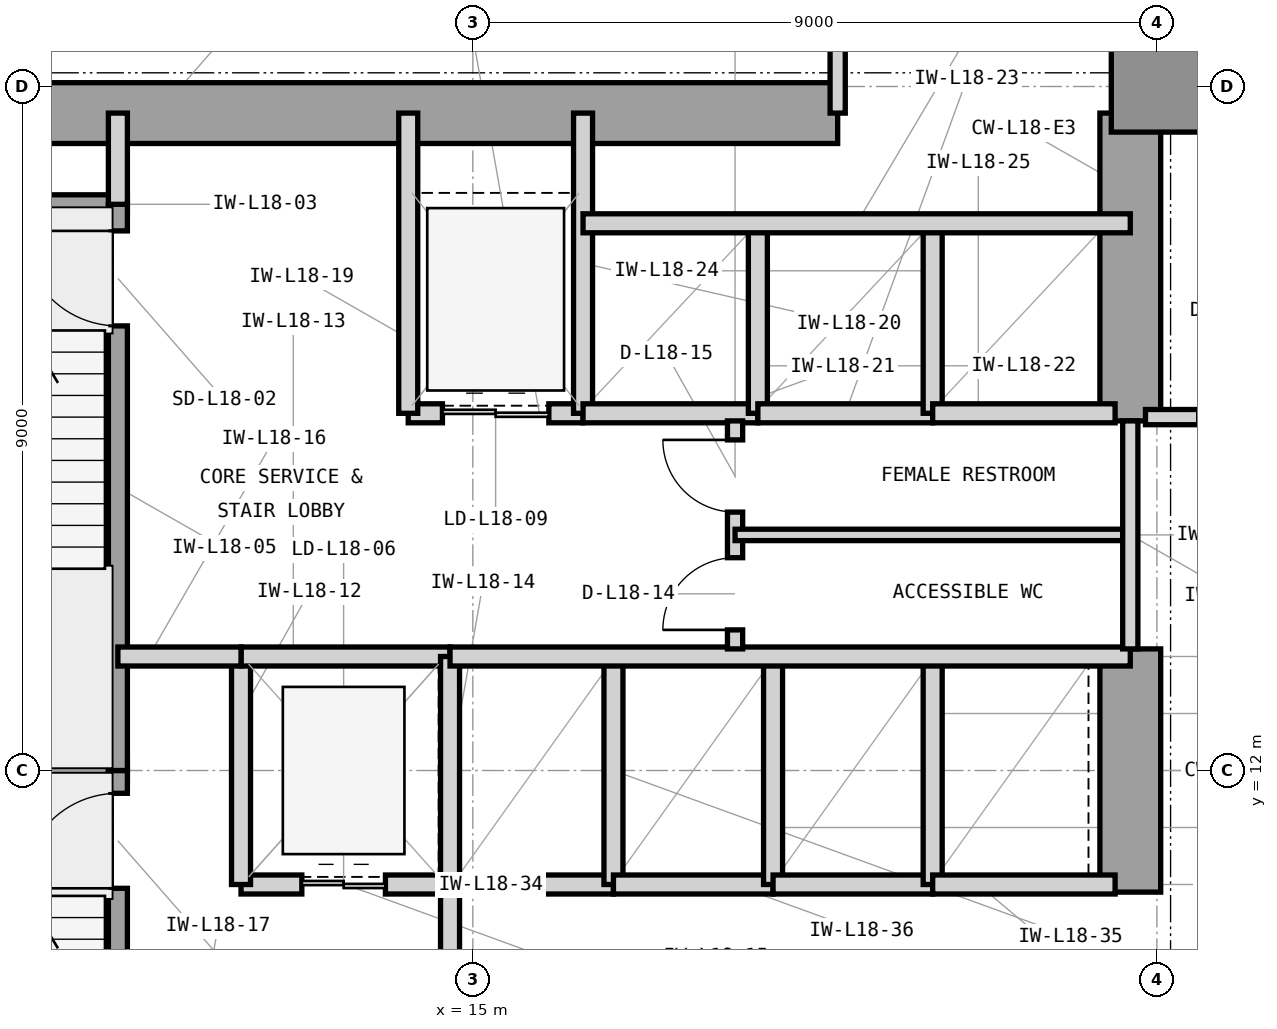
"""IFC4 building model, lengths in metres.
Left out: names, types, materials, properties, quantities, classifications, styles, units other than length and angle.
Written with IfcOpenShell. Run it as: python <this file> out.ifc"""

import sys

from ifc_helpers import new_model, si_unit, direction, frame, frame_2d, origin, origin_2d, place, context, subcontext, project, spatial, rectangle, extrude, element, fill, save


model = new_model("IFC4")
c1 = context("Model", 3, precision=1e-05, world=origin(), true_north=direction((0.0, 1.0)))
c2 = subcontext(c1, "Body", "Model", "MODEL_VIEW")
j1 = project(units=[si_unit("LENGTHUNIT", "METRE"), si_unit("PLANEANGLEUNIT", "RADIAN")], contexts=[c1])
p1 = place(None, origin())
s1 = spatial("IfcSite", under=j1, at=p1, CompositionType="ELEMENT")
p2 = place(p1, origin())
s2 = spatial("IfcBuilding", under=s1, at=p2, CompositionType="ELEMENT")
p3 = place(p2, frame((0.0, 0.0, 80.4)))
s3 = spatial("IfcBuildingStorey", under=s2, at=p3, CompositionType="ELEMENT", Elevation=80.4)
p4 = place(p3, frame((7.475, 20.65, 0.0), z_axis=(0.0, 0.0, 1.0), x_axis=(1.0, 0.0, 0.0)))
e1 = element("IfcWall", 1, at=p4, inside=s3, PredefinedType="SHEAR", context=c2, shape_type="SweptSolid", body=[
    extrude(rectangle(XDim=12.325, YDim=0.8, at=frame_2d((6.163, 0.0))), origin(), (0.0, 0.0, 1.0), 4.2),
])
p5 = place(p3, frame((23.65, 10.4, 0.0), z_axis=(0.0, 0.0, 1.0), x_axis=(0.0, 1.0, 0.0)))
e2 = element("IfcWall", 2, at=p5, inside=s3, PredefinedType="SHEAR", context=c2, shape_type="SweptSolid", body=[
    extrude(rectangle(XDim=3.2, YDim=0.8, at=frame_2d((1.6, 0.0))), origin(), (0.0, 0.0, 1.0), 4.2),
])
p6 = place(p3, frame((23.65, 16.6, 0.0), z_axis=(0.0, 0.0, 1.0), x_axis=(0.0, 1.0, 0.0)))
e3 = element("IfcWall", 3, at=p6, inside=s3, PredefinedType="SHEAR", context=c2, shape_type="SweptSolid", body=[
    extrude(rectangle(XDim=4.05, YDim=0.8, at=frame_2d((2.025, 0.0))), origin(), (0.0, 0.0, 1.0), 4.2),
])
p7 = place(p3, frame((24.0, 21.0, 0.0), z_axis=(0.0, 0.0, 1.0), x_axis=(1.0, 0.0, 0.0)))
e4 = element("IfcColumn", 4, at=p7, inside=s3, PredefinedType="COLUMN", context=c2, shape_type="SweptSolid", body=[
    extrude(rectangle(XDim=1.2, YDim=1.2, at=origin_2d()), origin(), (0.0, 0.0, 1.0), 4.2),
])
p8 = place(p3, frame((64.4, 20.79, 0.0), z_axis=(0.0, 0.0, 1.0), x_axis=(-1.0, 0.0, 0.0)))
e5 = element("IfcWall", 5, at=p8, inside=s3, PredefinedType="STANDARD", context=c2, shape_type="SweptSolid", body=[
    extrude(rectangle(XDim=40.4, YDim=0.42, at=frame_2d((20.2, 0.0))), origin(), (0.0, 0.0, 1.0), 3.92),
])
p9 = place(p8, frame((38.222, 0.0, 0.85)))
e6 = element("IfcOpeningElement", 6, at=p9, cuts=e5, PredefinedType="OPENING", context=c2, shape_type="SweptSolid", body=[
    extrude(rectangle(XDim=1.2, YDim=2.45, at=frame_2d((0.6, 1.225))), frame((0.0, 0.22, 0.0), z_axis=(0.0, -1.0, 0.0), x_axis=(1.0, 0.0, 0.0)), (0.0, 0.0, 1.0), 0.44),
])
p10 = place(p8, frame((32.386, 0.0, 0.85)))
e7 = element("IfcOpeningElement", 7, at=p10, cuts=e5, PredefinedType="OPENING", context=c2, shape_type="SweptSolid", body=[
    extrude(rectangle(XDim=2.8, YDim=2.45, at=frame_2d((1.4, 1.225))), frame((0.0, 0.22, 0.0), z_axis=(0.0, -1.0, 0.0), x_axis=(1.0, 0.0, 0.0)), (0.0, 0.0, 1.0), 0.44),
])
p11 = place(p8, frame((23.386, 0.0, 0.85)))
e8 = element("IfcOpeningElement", 8, at=p11, cuts=e5, PredefinedType="OPENING", context=c2, shape_type="SweptSolid", body=[
    extrude(rectangle(XDim=2.8, YDim=2.45, at=frame_2d((1.4, 1.225))), frame((0.0, 0.22, 0.0), z_axis=(0.0, -1.0, 0.0), x_axis=(1.0, 0.0, 0.0)), (0.0, 0.0, 1.0), 0.44),
])
p12 = place(p8, frame((17.386, 0.0, 0.85)))
e9 = element("IfcOpeningElement", 9, at=p12, cuts=e5, PredefinedType="OPENING", context=c2, shape_type="SweptSolid", body=[
    extrude(rectangle(XDim=2.1, YDim=2.45, at=frame_2d((1.05, 1.225))), frame((0.0, 0.22, 0.0), z_axis=(0.0, -1.0, 0.0), x_axis=(1.0, 0.0, 0.0)), (0.0, 0.0, 1.0), 0.44),
])
p13 = place(p8, frame((8.436, 0.0, 0.85)))
e10 = element("IfcOpeningElement", 10, at=p13, cuts=e5, PredefinedType="OPENING", context=c2, shape_type="SweptSolid", body=[
    extrude(rectangle(XDim=1.2, YDim=2.45, at=frame_2d((0.6, 1.225))), frame((0.0, 0.22, 0.0), z_axis=(0.0, -1.0, 0.0), x_axis=(1.0, 0.0, 0.0)), (0.0, 0.0, 1.0), 0.44),
])
p14 = place(p3, frame((23.79, 21.0, 0.0), z_axis=(0.0, 0.0, 1.0), x_axis=(0.0, 1.0, 0.0)))
e11 = element("IfcWall", 11, at=p14, inside=s3, PredefinedType="STANDARD", context=c2, shape_type="SweptSolid", body=[
    extrude(rectangle(XDim=28.4, YDim=0.42, at=frame_2d((14.2, 0.0))), origin(), (0.0, 0.0, 1.0), 3.92),
])
p15 = place(p14, frame((10.433, 0.0, 0.85)))
e12 = element("IfcOpeningElement", 12, at=p15, cuts=e11, PredefinedType="OPENING", context=c2, shape_type="SweptSolid", body=[
    extrude(rectangle(XDim=2.8, YDim=2.45, at=frame_2d((1.4, 1.225))), frame((0.0, 0.22, 0.0), z_axis=(0.0, -1.0, 0.0), x_axis=(1.0, 0.0, 0.0)), (0.0, 0.0, 1.0), 0.44),
])
p16 = place(p14, frame((21.966, 0.0, 0.85)))
e13 = element("IfcOpeningElement", 13, at=p16, cuts=e11, PredefinedType="OPENING", context=c2, shape_type="SweptSolid", body=[
    extrude(rectangle(XDim=1.2, YDim=2.45, at=frame_2d((0.6, 1.225))), frame((0.0, 0.22, 0.0), z_axis=(0.0, -1.0, 0.0), x_axis=(1.0, 0.0, 0.0)), (0.0, 0.0, 1.0), 0.44),
])
p17 = place(p3, frame((6.35, 12.0, 0.0), z_axis=(0.0, 0.0, 1.0), x_axis=(1.0, 0.0, 0.0)))
e14 = element("IfcWall", 14, at=p17, inside=s3, PredefinedType="SHEAR", context=c2, shape_type="SweptSolid", body=[
    extrude(rectangle(XDim=4.105, YDim=0.25, at=frame_2d((2.052, 0.0))), origin(), (0.0, 0.0, 1.0), 4.2),
])
p18 = place(p3, frame((7.7, 19.45, 0.0), z_axis=(0.0, 0.0, 1.0), x_axis=(1.0, 0.0, 0.0)))
e15 = element("IfcWall", 15, at=p18, inside=s3, PredefinedType="SHEAR", context=c2, shape_type="SweptSolid", body=[
    extrude(rectangle(XDim=2.755, YDim=0.25, at=frame_2d((1.377, 0.0))), origin(), (0.0, 0.0, 1.0), 4.2),
])
p19 = place(p3, frame((10.33, 4.55, 0.0), z_axis=(0.0, 0.0, 1.0), x_axis=(0.0, 1.0, 0.0)))
e16 = element("IfcWall", 16, at=p19, inside=s3, PredefinedType="SHEAR", context=c2, shape_type="SweptSolid", body=[
    extrude(rectangle(XDim=7.45, YDim=0.25, at=frame_2d((3.725, 0.0))), origin(), (0.0, 0.0, 1.0), 4.2),
])
p20 = place(p19, frame((5.9, 0.0, 0.0)))
e17 = element("IfcOpeningElement", 17, at=p20, cuts=e16, PredefinedType="OPENING", context=c2, shape_type="SweptSolid", body=[
    extrude(rectangle(XDim=1.25, YDim=2.2, at=frame_2d((0.625, 1.1))), frame((0.0, 0.135, 0.0), z_axis=(0.0, -1.0, 0.0), x_axis=(1.0, 0.0, 0.0)), (0.0, 0.0, 1.0), 0.27),
])
p21 = place(p3, frame((10.33, 12.0, 0.0), z_axis=(0.0, 0.0, 1.0), x_axis=(0.0, 1.0, 0.0)))
e18 = element("IfcWall", 18, at=p21, inside=s3, PredefinedType="SHEAR", context=c2, shape_type="SweptSolid", body=[
    extrude(rectangle(XDim=7.45, YDim=0.25, at=frame_2d((3.725, 0.0))), origin(), (0.0, 0.0, 1.0), 4.2),
])
p22 = place(p21, frame((5.85, 0.0, 0.0)))
e19 = element("IfcOpeningElement", 19, at=p22, cuts=e18, PredefinedType="OPENING", context=c2, shape_type="SweptSolid", body=[
    extrude(rectangle(XDim=1.25, YDim=2.2, at=frame_2d((0.625, 1.1))), frame((0.0, 0.135, 0.0), z_axis=(0.0, -1.0, 0.0), x_axis=(1.0, 0.0, 0.0)), (0.0, 0.0, 1.0), 0.27),
])
p23 = place(p3, frame((10.33, 19.45, 0.0), z_axis=(0.0, 0.0, 1.0), x_axis=(0.0, 1.0, 0.0)))
e20 = element("IfcWall", 20, at=p23, inside=s3, PredefinedType="PARTITIONING", context=c2, shape_type="SweptSolid", body=[
    extrude(rectangle(XDim=1.2, YDim=0.25, at=frame_2d((0.6, 0.0))), origin(), (0.0, 0.0, 1.0), 2.983),
])
p24 = place(p3, frame((11.95, 10.5, 0.0), z_axis=(0.0, 0.0, 1.0), x_axis=(1.0, 0.0, 0.0)))
e21 = element("IfcWall", 21, at=p24, inside=s3, PredefinedType="PARTITIONING", context=c2, shape_type="SweptSolid", body=[
    extrude(rectangle(XDim=2.75, YDim=0.25, at=frame_2d((1.375, 0.0))), origin(), (0.0, 0.0, 1.0), 3.293),
])
p25 = place(p24, frame((0.8, 0.0, 0.0)))
e22 = element("IfcOpeningElement", 22, at=p25, cuts=e21, PredefinedType="OPENING", context=c2, shape_type="SweptSolid", body=[
    extrude(rectangle(XDim=1.1, YDim=2.25, at=frame_2d((0.55, 1.125))), frame((0.0, 0.135, 0.0), z_axis=(0.0, -1.0, 0.0), x_axis=(1.0, 0.0, 0.0)), (0.0, 0.0, 1.0), 0.27),
])
p26 = place(p3, frame((11.95, 10.5, 0.0), z_axis=(0.0, 0.0, 1.0), x_axis=(0.0, 1.0, 0.0)))
e23 = element("IfcWall", 23, at=p26, inside=s3, PredefinedType="PARTITIONING", context=c2, shape_type="SweptSolid", body=[
    extrude(rectangle(XDim=3.0, YDim=0.25, at=frame_2d((1.5, 0.0))), origin(), (0.0, 0.0, 1.0), 3.91),
])
p27 = place(p3, frame((11.95, 13.5, 0.0), z_axis=(0.0, 0.0, 1.0), x_axis=(1.0, 0.0, 0.0)))
e24 = element("IfcWall", 24, at=p27, inside=s3, PredefinedType="PARTITIONING", context=c2, shape_type="SweptSolid", body=[
    extrude(rectangle(XDim=2.75, YDim=0.25, at=frame_2d((1.375, 0.0))), origin(), (0.0, 0.0, 1.0), 3.293),
])
p28 = place(p3, frame((14.7, 10.5, 0.0), z_axis=(0.0, 0.0, 1.0), x_axis=(0.0, 1.0, 0.0)))
e25 = element("IfcWall", 25, at=p28, inside=s3, PredefinedType="PARTITIONING", context=c2, shape_type="SweptSolid", body=[
    extrude(rectangle(XDim=3.0, YDim=0.25, at=frame_2d((1.5, 0.0))), origin(), (0.0, 0.0, 1.0), 3.91),
])
p29 = place(p3, frame((14.7, 6.7, 0.0), z_axis=(0.0, 0.0, 1.0), x_axis=(0.0, 1.0, 0.0)))
e26 = element("IfcWall", 26, at=p29, inside=s3, PredefinedType="PARTITIONING", context=c2, shape_type="SweptSolid", body=[
    extrude(rectangle(XDim=3.8, YDim=0.25, at=frame_2d((1.9, 0.0))), origin(), (0.0, 0.0, 1.0), 3.91),
])
p30 = place(p29, frame((1.3, 0.0, 0.0)))
e27 = element("IfcOpeningElement", 27, at=p30, cuts=e26, PredefinedType="OPENING", context=c2, shape_type="SweptSolid", body=[
    extrude(rectangle(XDim=1.2, YDim=2.2, at=frame_2d((0.6, 1.1))), frame((0.0, 0.135, 0.0), z_axis=(0.0, -1.0, 0.0), x_axis=(1.0, 0.0, 0.0)), (0.0, 0.0, 1.0), 0.27),
])
p31 = place(p3, frame((10.33, 13.5, 0.0), z_axis=(0.0, 0.0, 1.0), x_axis=(1.0, 0.0, 0.0)))
e28 = element("IfcWall", 28, at=p31, inside=s3, PredefinedType="PARTITIONING", context=c2, shape_type="SweptSolid", body=[
    extrude(rectangle(XDim=1.62, YDim=0.25, at=frame_2d((0.81, 0.0))), origin(), (0.0, 0.0, 1.0), 3.293),
])
p32 = place(p3, frame((14.15, 16.7, 0.0), z_axis=(0.0, 0.0, 1.0), x_axis=(1.0, 0.0, 0.0)))
e29 = element("IfcWall", 29, at=p32, inside=s3, PredefinedType="PARTITIONING", context=c2, shape_type="SweptSolid", body=[
    extrude(rectangle(XDim=2.3, YDim=0.25, at=frame_2d((1.15, 0.0))), origin(), (0.0, 0.0, 1.0), 3.293),
])
p33 = place(p32, frame((0.45, 0.0, 0.0)))
e30 = element("IfcOpeningElement", 30, at=p33, cuts=e29, PredefinedType="OPENING", context=c2, shape_type="SweptSolid", body=[
    extrude(rectangle(XDim=1.4, YDim=2.35, at=frame_2d((0.7, 1.175))), frame((0.0, 0.135, 0.0), z_axis=(0.0, -1.0, 0.0), x_axis=(1.0, 0.0, 0.0)), (0.0, 0.0, 1.0), 0.27),
])
for number, where, z_axis, x_axis in (
    (31, (14.15, 16.7, 0.0), (0.0, 0.0, 1.0), (0.0, 1.0, 0.0)),
    (32, (16.45, 16.7, 0.0), (0.0, 0.0, 1.0), (0.0, 1.0, 0.0)),
):
    element("IfcWall", number, at=place(p3, frame(where, z_axis=z_axis, x_axis=x_axis)), inside=s3, PredefinedType="PARTITIONING", context=c2, shape_type="SweptSolid", body=[
        extrude(rectangle(XDim=3.95, YDim=0.25, at=frame_2d((1.975, 0.0))), origin(), (0.0, 0.0, 1.0), 3.91),
    ])
p34 = place(p3, frame((16.45, 16.7, 0.0), z_axis=(0.0, 0.0, 1.0), x_axis=(1.0, 0.0, 0.0)))
e33 = element("IfcWall", 33, at=p34, inside=s3, PredefinedType="PARTITIONING", context=c2, shape_type="SweptSolid", body=[
    extrude(rectangle(XDim=2.3, YDim=0.25, at=frame_2d((1.15, 0.0))), origin(), (0.0, 0.0, 1.0), 3.293),
])
p35 = place(p3, frame((18.75, 16.7, 0.0), z_axis=(0.0, 0.0, 1.0), x_axis=(0.0, 1.0, 0.0)))
e34 = element("IfcWall", 34, at=p35, inside=s3, PredefinedType="PARTITIONING", context=c2, shape_type="SweptSolid", body=[
    extrude(rectangle(XDim=2.5, YDim=0.25, at=frame_2d((1.25, 0.0))), origin(), (0.0, 0.0, 1.0), 3.91),
])
p36 = place(p3, frame((18.75, 16.7, 0.0), z_axis=(0.0, 0.0, 1.0), x_axis=(1.0, 0.0, 0.0)))
e35 = element("IfcWall", 35, at=p36, inside=s3, PredefinedType="PARTITIONING", context=c2, shape_type="SweptSolid", body=[
    extrude(rectangle(XDim=2.3, YDim=0.25, at=frame_2d((1.15, 0.0))), origin(), (0.0, 0.0, 1.0), 3.293),
])
p37 = place(p3, frame((21.05, 16.7, 0.0), z_axis=(0.0, 0.0, 1.0), x_axis=(0.0, 1.0, 0.0)))
e36 = element("IfcWall", 36, at=p37, inside=s3, PredefinedType="PARTITIONING", context=c2, shape_type="SweptSolid", body=[
    extrude(rectangle(XDim=2.5, YDim=0.25, at=frame_2d((1.25, 0.0))), origin(), (0.0, 0.0, 1.0), 3.91),
])
p38 = place(p3, frame((21.05, 16.7, 0.0), z_axis=(0.0, 0.0, 1.0), x_axis=(1.0, 0.0, 0.0)))
e37 = element("IfcWall", 37, at=p38, inside=s3, PredefinedType="PARTITIONING", context=c2, shape_type="SweptSolid", body=[
    extrude(rectangle(XDim=2.4, YDim=0.25, at=frame_2d((1.2, 0.0))), origin(), (0.0, 0.0, 1.0), 3.293),
])
p39 = place(p3, frame((16.45, 19.2, 0.0), z_axis=(0.0, 0.0, 1.0), x_axis=(1.0, 0.0, 0.0)))
e38 = element("IfcWall", 38, at=p39, inside=s3, PredefinedType="PARTITIONING", context=c2, shape_type="SweptSolid", body=[
    extrude(rectangle(XDim=7.2, YDim=0.25, at=frame_2d((3.6, 0.0))), origin(), (0.0, 0.0, 1.0), 3.91),
])
p40 = place(p3, frame((14.7, 10.5, 0.0), z_axis=(0.0, 0.0, 1.0), x_axis=(1.0, 0.0, 0.0)))
e39 = element("IfcWall", 39, at=p40, inside=s3, PredefinedType="PARTITIONING", context=c2, shape_type="SweptSolid", body=[
    extrude(rectangle(XDim=2.15, YDim=0.25, at=frame_2d((1.075, 0.0))), origin(), (0.0, 0.0, 1.0), 3.293),
])
p41 = place(p3, frame((16.85, 10.5, 0.0), z_axis=(0.0, 0.0, 1.0), x_axis=(0.0, 1.0, 0.0)))
e40 = element("IfcWall", 40, at=p41, inside=s3, PredefinedType="PARTITIONING", context=c2, shape_type="SweptSolid", body=[
    extrude(rectangle(XDim=3.0, YDim=0.25, at=frame_2d((1.5, 0.0))), origin(), (0.0, 0.0, 1.0), 3.91),
])
p42 = place(p3, frame((16.85, 10.5, 0.0), z_axis=(0.0, 0.0, 1.0), x_axis=(1.0, 0.0, 0.0)))
e41 = element("IfcWall", 41, at=p42, inside=s3, PredefinedType="PARTITIONING", context=c2, shape_type="SweptSolid", body=[
    extrude(rectangle(XDim=2.1, YDim=0.25, at=frame_2d((1.05, 0.0))), origin(), (0.0, 0.0, 1.0), 3.293),
])
p43 = place(p3, frame((18.95, 10.5, 0.0), z_axis=(0.0, 0.0, 1.0), x_axis=(0.0, 1.0, 0.0)))
e42 = element("IfcWall", 42, at=p43, inside=s3, PredefinedType="PARTITIONING", context=c2, shape_type="SweptSolid", body=[
    extrude(rectangle(XDim=3.0, YDim=0.25, at=frame_2d((1.5, 0.0))), origin(), (0.0, 0.0, 1.0), 3.91),
])
p44 = place(p3, frame((18.95, 10.5, 0.0), z_axis=(0.0, 0.0, 1.0), x_axis=(1.0, 0.0, 0.0)))
e43 = element("IfcWall", 43, at=p44, inside=s3, PredefinedType="PARTITIONING", context=c2, shape_type="SweptSolid", body=[
    extrude(rectangle(XDim=2.1, YDim=0.25, at=frame_2d((1.05, 0.0))), origin(), (0.0, 0.0, 1.0), 3.293),
])
p45 = place(p3, frame((21.05, 10.5, 0.0), z_axis=(0.0, 0.0, 1.0), x_axis=(0.0, 1.0, 0.0)))
e44 = element("IfcWall", 44, at=p45, inside=s3, PredefinedType="PARTITIONING", context=c2, shape_type="SweptSolid", body=[
    extrude(rectangle(XDim=3.0, YDim=0.25, at=frame_2d((1.5, 0.0))), origin(), (0.0, 0.0, 1.0), 3.91),
])
p46 = place(p3, frame((21.05, 10.5, 0.0), z_axis=(0.0, 0.0, 1.0), x_axis=(1.0, 0.0, 0.0)))
e45 = element("IfcWall", 45, at=p46, inside=s3, PredefinedType="PARTITIONING", context=c2, shape_type="SweptSolid", body=[
    extrude(rectangle(XDim=2.4, YDim=0.25, at=frame_2d((1.2, 0.0))), origin(), (0.0, 0.0, 1.0), 3.293),
])
p47 = place(p3, frame((14.7, 13.5, 0.0), z_axis=(0.0, 0.0, 1.0), x_axis=(1.0, 0.0, 0.0)))
e46 = element("IfcWall", 46, at=p47, inside=s3, PredefinedType="PARTITIONING", context=c2, shape_type="SweptSolid", body=[
    extrude(rectangle(XDim=8.95, YDim=0.25, at=frame_2d((4.475, 0.0))), origin(), (0.0, 0.0, 1.0), 3.293),
])
p48 = place(p3, frame((18.45, 13.6, 0.0), z_axis=(0.0, 0.0, 1.0), x_axis=(0.0, 1.0, 0.0)))
e47 = element("IfcWall", 47, at=p48, inside=s3, PredefinedType="PARTITIONING", context=c2, shape_type="SweptSolid", body=[
    extrude(rectangle(XDim=3.0, YDim=0.2, at=frame_2d((1.5, 0.0))), origin(), (0.0, 0.0, 1.0), 3.91),
])
p49 = place(p48, frame((0.25, 0.0, 0.0)))
e48 = element("IfcOpeningElement", 48, at=p49, cuts=e47, PredefinedType="OPENING", context=c2, shape_type="SweptSolid", body=[
    extrude(rectangle(XDim=0.95, YDim=2.1, at=frame_2d((0.475, 1.05))), frame((0.0, 0.11, 0.0), z_axis=(0.0, -1.0, 0.0), x_axis=(1.0, 0.0, 0.0)), (0.0, 0.0, 1.0), 0.22),
])
p50 = place(p48, frame((1.8, 0.0, 0.0)))
e49 = element("IfcOpeningElement", 49, at=p50, cuts=e47, PredefinedType="OPENING", context=c2, shape_type="SweptSolid", body=[
    extrude(rectangle(XDim=0.95, YDim=2.1, at=frame_2d((0.475, 1.05))), frame((0.0, 0.11, 0.0), z_axis=(0.0, -1.0, 0.0), x_axis=(1.0, 0.0, 0.0)), (0.0, 0.0, 1.0), 0.22),
])
p51 = place(p3, frame((18.45, 15.1, 0.0), z_axis=(0.0, 0.0, 1.0), x_axis=(1.0, 0.0, 0.0)))
e50 = element("IfcWall", 50, at=p51, inside=s3, PredefinedType="PARTITIONING", context=c2, shape_type="SweptSolid", body=[
    extrude(rectangle(XDim=5.2, YDim=0.15, at=frame_2d((2.6, 0.0))), origin(), (0.0, 0.0, 1.0), 3.91),
])
p52 = place(p3, frame((23.65, 13.6, 0.0), z_axis=(0.0, 0.0, 1.0), x_axis=(0.0, 1.0, 0.0)))
e51 = element("IfcWall", 51, at=p52, inside=s3, PredefinedType="PARTITIONING", context=c2, shape_type="SweptSolid", body=[
    extrude(rectangle(XDim=3.0, YDim=0.2, at=frame_2d((1.5, 0.0))), origin(), (0.0, 0.0, 1.0), 3.91),
])
p53 = place(p3, frame((23.85, 16.65, 0.0), z_axis=(0.0, 0.0, 1.0), x_axis=(1.0, 0.0, 0.0)))
e52 = element("IfcWall", 52, at=p53, inside=s3, PredefinedType="PARTITIONING", context=c2, shape_type="SweptSolid", body=[
    extrude(rectangle(XDim=2.85, YDim=0.2, at=frame_2d((1.425, 0.0))), origin(), (0.0, 0.0, 1.0), 3.91),
])
p54 = place(p53, frame((0.7, 0.0, 0.0)))
e53 = element("IfcOpeningElement", 53, at=p54, cuts=e52, PredefinedType="OPENING", context=c2, shape_type="SweptSolid", body=[
    extrude(rectangle(XDim=1.0, YDim=2.15, at=frame_2d((0.5, 1.075))), frame((0.0, 0.11, 0.0), z_axis=(0.0, -1.0, 0.0), x_axis=(1.0, 0.0, 0.0)), (0.0, 0.0, 1.0), 0.22),
])
p55 = place(p3, frame((19.8, 20.65, 0.0), z_axis=(0.0, 0.0, 1.0), x_axis=(0.0, 1.0, 0.0)))
e54 = element("IfcWall", 54, at=p55, inside=s3, PredefinedType="PARTITIONING", context=c2, shape_type="SweptSolid", body=[
    extrude(rectangle(XDim=6.15, YDim=0.2, at=frame_2d((3.075, 0.0))), origin(), (0.0, 0.0, 1.0), 3.91),
])
p56 = place(p20, origin())
e55 = element("IfcDoor", 55, at=p56, inside=s3, OperationType="SINGLE_SWING_LEFT", PredefinedType="DOOR", context=c2, shape_type="SweptSolid", body=[
    extrude(rectangle(XDim=1.25, YDim=2.2, at=frame_2d((0.625, 1.1))), frame((0.0, 0.025, 0.0), z_axis=(0.0, -1.0, 0.0), x_axis=(1.0, 0.0, 0.0)), (0.0, 0.0, 1.0), 0.05),
])
fill(e17, e55)
p57 = place(p22, origin())
e56 = element("IfcDoor", 56, at=p57, inside=s3, OperationType="SINGLE_SWING_RIGHT", PredefinedType="DOOR", context=c2, shape_type="SweptSolid", body=[
    extrude(rectangle(XDim=1.25, YDim=2.2, at=frame_2d((0.625, 1.1))), frame((0.0, 0.025, 0.0), z_axis=(0.0, -1.0, 0.0), x_axis=(1.0, 0.0, 0.0)), (0.0, 0.0, 1.0), 0.05),
])
fill(e19, e56)
p58 = place(p25, origin())
e57 = element("IfcDoor", 57, at=p58, inside=s3, OperationType="DOUBLE_DOOR_SLIDING", PredefinedType="DOOR", context=c2, shape_type="SweptSolid", body=[
    extrude(rectangle(XDim=1.1, YDim=2.25, at=frame_2d((0.55, 1.125))), frame((0.0, 0.025, 0.0), z_axis=(0.0, -1.0, 0.0), x_axis=(1.0, 0.0, 0.0)), (0.0, 0.0, 1.0), 0.05),
])
fill(e22, e57)
p59 = place(p33, origin())
e58 = element("IfcDoor", 58, at=p59, inside=s3, OperationType="DOUBLE_DOOR_SLIDING", PredefinedType="DOOR", context=c2, shape_type="SweptSolid", body=[
    extrude(rectangle(XDim=1.4, YDim=2.35, at=frame_2d((0.7, 1.175))), frame((0.0, 0.025, 0.0), z_axis=(0.0, -1.0, 0.0), x_axis=(1.0, 0.0, 0.0)), (0.0, 0.0, 1.0), 0.05),
])
fill(e30, e58)
p60 = place(p49, origin())
e59 = element("IfcDoor", 59, at=p60, inside=s3, OperationType="SINGLE_SWING_LEFT", PredefinedType="DOOR", context=c2, shape_type="SweptSolid", body=[
    extrude(rectangle(XDim=0.95, YDim=2.1, at=frame_2d((0.475, 1.05))), frame((0.0, 0.025, 0.0), z_axis=(0.0, -1.0, 0.0), x_axis=(1.0, 0.0, 0.0)), (0.0, 0.0, 1.0), 0.05),
])
fill(e48, e59)
p61 = place(p50, origin())
e60 = element("IfcDoor", 60, at=p61, inside=s3, OperationType="SINGLE_SWING_RIGHT", PredefinedType="DOOR", context=c2, shape_type="SweptSolid", body=[
    extrude(rectangle(XDim=0.95, YDim=2.1, at=frame_2d((0.475, 1.05))), frame((0.0, 0.025, 0.0), z_axis=(0.0, -1.0, 0.0), x_axis=(1.0, 0.0, 0.0)), (0.0, 0.0, 1.0), 0.05),
])
fill(e49, e60)
save(model, sys.argv[1])
